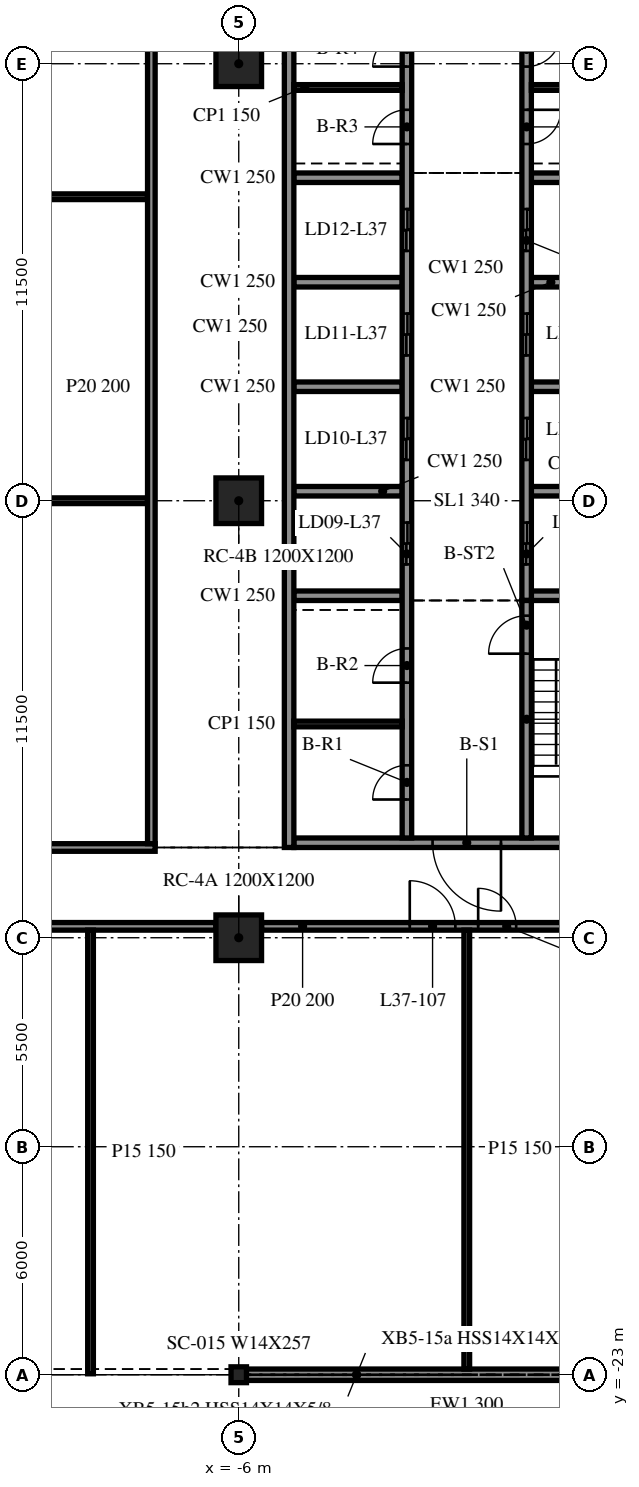
"""IFC4 building model, lengths in metres.
Left out: names, types, materials, properties, quantities, classifications, styles, units other than length and angle.
Written with IfcOpenShell. Run it as: python <this file> out.ifc"""

import sys

from ifc_helpers import new_model, si_unit, direction, frame, frame_2d, origin, origin_2d, place, context, subcontext, project, spatial, rectangle, i_section, extrude, element, fill, save


model = new_model("IFC4")
c1 = context("Model", 3, precision=1e-05, world=origin(), true_north=direction((0.0, 1.0)))
c2 = subcontext(c1, "Body", "Model", "MODEL_VIEW")
j1 = project(units=[si_unit("LENGTHUNIT", "METRE"), si_unit("PLANEANGLEUNIT", "RADIAN")], contexts=[c1])
p1 = place(None, origin())
s1 = spatial("IfcSite", under=j1, at=p1, CompositionType="ELEMENT")
p2 = place(p1, origin())
s2 = spatial("IfcBuilding", under=s1, at=p2, CompositionType="ELEMENT")
p3 = place(p2, frame((0.0, 0.0, 159.2)))
s3 = spatial("IfcBuildingStorey", under=s2, at=p3, CompositionType="ELEMENT", Elevation=159.2)
for number, where, z_axis, x_axis in (
    (1, (-6.0, -11.5, -0.34), (0.0, 0.0, 1.0), (1.0, 0.0, 0.0)),
    (2, (-6.0, 0.0, -0.34), (0.0, 0.0, 1.0), (1.0, 0.0, 0.0)),
    (3, (-6.0, 11.5, -0.34), (0.0, 0.0, 1.0), (1.0, 0.0, 0.0)),
):
    element("IfcColumn", number, at=place(p3, frame(where, z_axis=z_axis, x_axis=x_axis)), inside=s3, PredefinedType="COLUMN", context=c2, shape_type="SweptSolid", body=[
        extrude(rectangle(XDim=1.2, YDim=1.2, at=origin_2d()), origin(), (0.0, 0.0, 1.0), 3.8),
    ])
p4 = place(p3, frame((-6.0, -23.0, -0.34), z_axis=(0.0, 0.0, 1.0), x_axis=(1.0, 0.0, 0.0)))
e4 = element("IfcColumn", 4, at=p4, inside=s3, PredefinedType="COLUMN", context=c2, shape_type="SweptSolid", body=[
    extrude(i_section(OverallWidth=0.406, OverallDepth=0.417, WebThickness=0.03, FlangeThickness=0.048, at=origin_2d()), origin(), (0.0, 0.0, 1.0), 3.8),
])
p5 = place(p3, frame((-5.985, -23.0, 0.0), z_axis=(0.0, 0.0, 1.0), x_axis=(1.0, 0.0, 0.0)))
e5 = element("IfcWall", 5, at=p5, inside=s3, PredefinedType="NOTDEFINED", context=c2, shape_type="SweptSolid", body=[
    extrude(rectangle(XDim=11.97, YDim=0.3, at=frame_2d((5.985, 0.0))), origin(), (0.0, 0.0, 1.0), 2.782),
])
p6 = place(p3, frame((-4.675, 15.125, 0.0), z_axis=(0.0, 0.0, 1.0), x_axis=(0.0, -1.0, 0.0)))
e6 = element("IfcWall", 6, at=p6, inside=s3, PredefinedType="SOLIDWALL", context=c2, shape_type="SweptSolid", body=[
    extrude(rectangle(XDim=24.25, YDim=0.25, at=frame_2d((12.125, 0.0))), origin(), (0.0, 0.0, 1.0), 3.46),
])
p7 = place(p3, frame((4.55, -9.0, 0.0), z_axis=(0.0, 0.0, 1.0), x_axis=(-1.0, 0.0, 0.0)))
e7 = element("IfcWall", 7, at=p7, inside=s3, PredefinedType="SOLIDWALL", context=c2, shape_type="SweptSolid", body=[
    extrude(rectangle(XDim=9.1, YDim=0.25, at=frame_2d((4.55, 0.0))), origin(), (0.0, 0.0, 1.0), 3.46),
])
p8 = place(p7, frame((3.65, 0.0, 0.0)))
e8 = element("IfcOpeningElement", 8, at=p8, cuts=e7, PredefinedType="OPENING", context=c2, shape_type="SweptSolid", body=[
    extrude(rectangle(XDim=1.8, YDim=2.1, at=frame_2d((0.9, 1.05))), frame((0.0, 0.135, 0.0), z_axis=(0.0, -1.0, 0.0), x_axis=(1.0, 0.0, 0.0)), (0.0, 0.0, 1.0), 0.27),
])
p9 = place(p3, frame((-1.575, -8.875, 0.0), z_axis=(0.0, 0.0, 1.0), x_axis=(0.0, 1.0, 0.0)))
e9 = element("IfcWall", 9, at=p9, inside=s3, PredefinedType="SOLIDWALL", context=c2, shape_type="SweptSolid", body=[
    extrude(rectangle(XDim=23.75, YDim=0.25, at=frame_2d((11.875, 0.0))), origin(), (0.0, 0.0, 1.0), 3.46),
])
p10 = place(p9, frame((7.2, 0.0, 0.0)))
e10 = element("IfcOpeningElement", 10, at=p10, cuts=e9, PredefinedType="OPENING", context=c2, shape_type="SweptSolid", body=[
    extrude(rectangle(XDim=1.1, YDim=2.1, at=frame_2d((0.55, 1.05))), frame((0.0, 0.135, 0.0), z_axis=(0.0, -1.0, 0.0), x_axis=(1.0, 0.0, 0.0)), (0.0, 0.0, 1.0), 0.27),
])
p11 = place(p9, frame((9.95, 0.0, 0.0)))
e11 = element("IfcOpeningElement", 11, at=p11, cuts=e9, PredefinedType="OPENING", context=c2, shape_type="SweptSolid", body=[
    extrude(rectangle(XDim=1.1, YDim=2.1, at=frame_2d((0.55, 1.05))), frame((0.0, 0.135, 0.0), z_axis=(0.0, -1.0, 0.0), x_axis=(1.0, 0.0, 0.0)), (0.0, 0.0, 1.0), 0.27),
])
p12 = place(p9, frame((12.7, 0.0, 0.0)))
e12 = element("IfcOpeningElement", 12, at=p12, cuts=e9, PredefinedType="OPENING", context=c2, shape_type="SweptSolid", body=[
    extrude(rectangle(XDim=1.1, YDim=2.1, at=frame_2d((0.55, 1.05))), frame((0.0, 0.135, 0.0), z_axis=(0.0, -1.0, 0.0), x_axis=(1.0, 0.0, 0.0)), (0.0, 0.0, 1.0), 0.27),
])
p13 = place(p9, frame((15.45, 0.0, 0.0)))
e13 = element("IfcOpeningElement", 13, at=p13, cuts=e9, PredefinedType="OPENING", context=c2, shape_type="SweptSolid", body=[
    extrude(rectangle(XDim=1.1, YDim=2.1, at=frame_2d((0.55, 1.05))), frame((0.0, 0.135, 0.0), z_axis=(0.0, -1.0, 0.0), x_axis=(1.0, 0.0, 0.0)), (0.0, 0.0, 1.0), 0.27),
])
p14 = place(p9, frame((1.012, 0.0, 0.0)))
e14 = element("IfcOpeningElement", 14, at=p14, cuts=e9, PredefinedType="OPENING", context=c2, shape_type="SweptSolid", body=[
    extrude(rectangle(XDim=0.9, YDim=2.1, at=frame_2d((0.45, 1.05))), frame((0.0, 0.135, 0.0), z_axis=(0.0, -1.0, 0.0), x_axis=(1.0, 0.0, 0.0)), (0.0, 0.0, 1.0), 0.27),
])
p15 = place(p9, frame((4.087, 0.0, 0.0)))
e15 = element("IfcOpeningElement", 15, at=p15, cuts=e9, PredefinedType="OPENING", context=c2, shape_type="SweptSolid", body=[
    extrude(rectangle(XDim=0.9, YDim=2.1, at=frame_2d((0.45, 1.05))), frame((0.0, 0.135, 0.0), z_axis=(0.0, -1.0, 0.0), x_axis=(1.0, 0.0, 0.0)), (0.0, 0.0, 1.0), 0.27),
])
p16 = place(p9, frame((18.262, 0.0, 0.0)))
e16 = element("IfcOpeningElement", 16, at=p16, cuts=e9, PredefinedType="OPENING", context=c2, shape_type="SweptSolid", body=[
    extrude(rectangle(XDim=0.9, YDim=2.1, at=frame_2d((0.45, 1.05))), frame((0.0, 0.135, 0.0), z_axis=(0.0, -1.0, 0.0), x_axis=(1.0, 0.0, 0.0)), (0.0, 0.0, 1.0), 0.27),
])
p17 = place(p9, frame((20.3, 0.0, 0.0)))
e17 = element("IfcOpeningElement", 17, at=p17, cuts=e9, PredefinedType="OPENING", context=c2, shape_type="SweptSolid", body=[
    extrude(rectangle(XDim=0.9, YDim=2.1, at=frame_2d((0.45, 1.05))), frame((0.0, 0.135, 0.0), z_axis=(0.0, -1.0, 0.0), x_axis=(1.0, 0.0, 0.0)), (0.0, 0.0, 1.0), 0.27),
])
p18 = place(p9, frame((22.337, 0.0, 0.0)))
e18 = element("IfcOpeningElement", 18, at=p18, cuts=e9, PredefinedType="OPENING", context=c2, shape_type="SweptSolid", body=[
    extrude(rectangle(XDim=0.9, YDim=2.1, at=frame_2d((0.45, 1.05))), frame((0.0, 0.135, 0.0), z_axis=(0.0, -1.0, 0.0), x_axis=(1.0, 0.0, 0.0)), (0.0, 0.0, 1.0), 0.27),
])
p19 = place(p3, frame((1.575, -8.875, 0.0), z_axis=(0.0, 0.0, 1.0), x_axis=(0.0, 1.0, 0.0)))
e19 = element("IfcWall", 19, at=p19, inside=s3, PredefinedType="SOLIDWALL", context=c2, shape_type="SweptSolid", body=[
    extrude(rectangle(XDim=6.25, YDim=0.25, at=frame_2d((3.125, 0.0))), origin(), (0.0, 0.0, 1.0), 3.46),
])
p20 = place(p19, frame((4.85, 0.0, 0.0)))
e20 = element("IfcOpeningElement", 20, at=p20, cuts=e19, PredefinedType="OPENING", context=c2, shape_type="SweptSolid", body=[
    extrude(rectangle(XDim=1.0, YDim=2.1, at=frame_2d((0.5, 1.05))), frame((0.0, 0.135, 0.0), z_axis=(0.0, -1.0, 0.0), x_axis=(1.0, 0.0, 0.0)), (0.0, 0.0, 1.0), 0.27),
])
p21 = place(p3, frame((1.575, 14.875, 0.0), z_axis=(0.0, 0.0, 1.0), x_axis=(0.0, -1.0, 0.0)))
e21 = element("IfcWall", 21, at=p21, inside=s3, PredefinedType="SOLIDWALL", context=c2, shape_type="SweptSolid", body=[
    extrude(rectangle(XDim=17.5, YDim=0.25, at=frame_2d((8.75, 0.0))), origin(), (0.0, 0.0, 1.0), 3.46),
])
p22 = place(p21, frame((15.45, 0.0, 0.0)))
e22 = element("IfcOpeningElement", 22, at=p22, cuts=e21, PredefinedType="OPENING", context=c2, shape_type="SweptSolid", body=[
    extrude(rectangle(XDim=1.1, YDim=2.1, at=frame_2d((0.55, 1.05))), frame((0.0, 0.135, 0.0), z_axis=(0.0, -1.0, 0.0), x_axis=(1.0, 0.0, 0.0)), (0.0, 0.0, 1.0), 0.27),
])
p23 = place(p21, frame((12.7, 0.0, 0.0)))
e23 = element("IfcOpeningElement", 23, at=p23, cuts=e21, PredefinedType="OPENING", context=c2, shape_type="SweptSolid", body=[
    extrude(rectangle(XDim=1.1, YDim=2.1, at=frame_2d((0.55, 1.05))), frame((0.0, 0.135, 0.0), z_axis=(0.0, -1.0, 0.0), x_axis=(1.0, 0.0, 0.0)), (0.0, 0.0, 1.0), 0.27),
])
p24 = place(p21, frame((9.95, 0.0, 0.0)))
e24 = element("IfcOpeningElement", 24, at=p24, cuts=e21, PredefinedType="OPENING", context=c2, shape_type="SweptSolid", body=[
    extrude(rectangle(XDim=1.1, YDim=2.1, at=frame_2d((0.55, 1.05))), frame((0.0, 0.135, 0.0), z_axis=(0.0, -1.0, 0.0), x_axis=(1.0, 0.0, 0.0)), (0.0, 0.0, 1.0), 0.27),
])
p25 = place(p21, frame((7.2, 0.0, 0.0)))
e25 = element("IfcOpeningElement", 25, at=p25, cuts=e21, PredefinedType="OPENING", context=c2, shape_type="SweptSolid", body=[
    extrude(rectangle(XDim=1.1, YDim=2.1, at=frame_2d((0.55, 1.05))), frame((0.0, 0.135, 0.0), z_axis=(0.0, -1.0, 0.0), x_axis=(1.0, 0.0, 0.0)), (0.0, 0.0, 1.0), 0.27),
])
p26 = place(p21, frame((4.587, 0.0, 0.0)))
e26 = element("IfcOpeningElement", 26, at=p26, cuts=e21, PredefinedType="OPENING", context=c2, shape_type="SweptSolid", body=[
    extrude(rectangle(XDim=0.9, YDim=2.1, at=frame_2d((0.45, 1.05))), frame((0.0, 0.135, 0.0), z_axis=(0.0, -1.0, 0.0), x_axis=(1.0, 0.0, 0.0)), (0.0, 0.0, 1.0), 0.27),
])
p27 = place(p21, frame((2.55, 0.0, 0.0)))
e27 = element("IfcOpeningElement", 27, at=p27, cuts=e21, PredefinedType="OPENING", context=c2, shape_type="SweptSolid", body=[
    extrude(rectangle(XDim=0.9, YDim=2.1, at=frame_2d((0.45, 1.05))), frame((0.0, 0.135, 0.0), z_axis=(0.0, -1.0, 0.0), x_axis=(1.0, 0.0, 0.0)), (0.0, 0.0, 1.0), 0.27),
])
p28 = place(p21, frame((0.512, 0.0, 0.0)))
e28 = element("IfcOpeningElement", 28, at=p28, cuts=e21, PredefinedType="OPENING", context=c2, shape_type="SweptSolid", body=[
    extrude(rectangle(XDim=0.9, YDim=2.1, at=frame_2d((0.45, 1.05))), frame((0.0, 0.135, 0.0), z_axis=(0.0, -1.0, 0.0), x_axis=(1.0, 0.0, 0.0)), (0.0, 0.0, 1.0), 0.27),
])
for number, where, z_axis, x_axis in (
    (29, (-4.55, -2.5, 0.0), (0.0, 0.0, 1.0), (1.0, 0.0, 0.0)),
    (30, (-4.55, 0.25, 0.0), (0.0, 0.0, 1.0), (1.0, 0.0, 0.0)),
    (31, (-4.55, 3.0, 0.0), (0.0, 0.0, 1.0), (1.0, 0.0, 0.0)),
    (32, (-4.55, 5.75, 0.0), (0.0, 0.0, 1.0), (1.0, 0.0, 0.0)),
    (33, (-4.55, 8.5, 0.0), (0.0, 0.0, 1.0), (1.0, 0.0, 0.0)),
    (34, (1.7, -2.5, 0.0), (0.0, 0.0, 1.0), (1.0, 0.0, 0.0)),
    (35, (1.7, 0.25, 0.0), (0.0, 0.0, 1.0), (1.0, 0.0, 0.0)),
    (36, (1.7, 3.0, 0.0), (0.0, 0.0, 1.0), (1.0, 0.0, 0.0)),
    (37, (1.7, 5.75, 0.0), (0.0, 0.0, 1.0), (1.0, 0.0, 0.0)),
    (38, (1.7, 8.5, 0.0), (0.0, 0.0, 1.0), (1.0, 0.0, 0.0)),
):
    element("IfcWall", number, at=place(p3, frame(where, z_axis=z_axis, x_axis=x_axis)), inside=s3, PredefinedType="SOLIDWALL", context=c2, shape_type="SweptSolid", body=[
        extrude(rectangle(XDim=2.85, YDim=0.25, at=frame_2d((1.425, 0.0))), origin(), (0.0, 0.0, 1.0), 3.46),
    ])
for number, where, z_axis, x_axis in (
    (39, (-4.55, -5.875, 0.0), (0.0, 0.0, 1.0), (1.0, 0.0, 0.0)),
    (40, (-4.55, 10.875, 0.0), (0.0, 0.0, 1.0), (1.0, 0.0, 0.0)),
    (41, (1.7, 10.875, 0.0), (0.0, 0.0, 1.0), (1.0, 0.0, 0.0)),
):
    element("IfcWall", number, at=place(p3, frame(where, z_axis=z_axis, x_axis=x_axis)), inside=s3, PredefinedType="PARTITIONING", context=c2, shape_type="SweptSolid", body=[
        extrude(rectangle(XDim=2.85, YDim=0.15, at=frame_2d((1.425, 0.0))), origin(), (0.0, 0.0, 1.0), 3.46),
    ])
p29 = place(p3, frame((-17.4, -11.2, 0.0), z_axis=(0.0, 0.0, 1.0), x_axis=(1.0, 0.0, 0.0)))
e42 = element("IfcWall", 42, at=p29, inside=s3, PredefinedType="PARTITIONING", context=c2, shape_type="SweptSolid", body=[
    extrude(rectangle(XDim=10.8, YDim=0.2, at=frame_2d((5.4, 0.0))), origin(), (0.0, 0.0, 1.0), 3.46),
])
p30 = place(p29, frame((4.7, 0.0, 0.0)))
e43 = element("IfcOpeningElement", 43, at=p30, cuts=e42, PredefinedType="OPENING", context=c2, shape_type="SweptSolid", body=[
    extrude(rectangle(XDim=1.2, YDim=2.1, at=frame_2d((0.6, 1.05))), frame((0.0, 0.11, 0.0), z_axis=(0.0, -1.0, 0.0), x_axis=(1.0, 0.0, 0.0)), (0.0, 0.0, 1.0), 0.22),
])
p31 = place(p3, frame((-5.4, -11.2, 0.0), z_axis=(0.0, 0.0, 1.0), x_axis=(1.0, 0.0, 0.0)))
e44 = element("IfcWall", 44, at=p31, inside=s3, PredefinedType="PARTITIONING", context=c2, shape_type="SweptSolid", body=[
    extrude(rectangle(XDim=10.8, YDim=0.2, at=frame_2d((5.4, 0.0))), origin(), (0.0, 0.0, 1.0), 3.46),
])
p32 = place(p31, frame((3.9, 0.0, 0.0)))
e45 = element("IfcOpeningElement", 45, at=p32, cuts=e44, PredefinedType="OPENING", context=c2, shape_type="SweptSolid", body=[
    extrude(rectangle(XDim=1.2, YDim=2.1, at=frame_2d((0.6, 1.05))), frame((0.0, 0.11, 0.0), z_axis=(0.0, -1.0, 0.0), x_axis=(1.0, 0.0, 0.0)), (0.0, 0.0, 1.0), 0.22),
])
p33 = place(p31, frame((5.7, 0.0, 0.0)))
e46 = element("IfcOpeningElement", 46, at=p33, cuts=e44, PredefinedType="OPENING", context=c2, shape_type="SweptSolid", body=[
    extrude(rectangle(XDim=1.0, YDim=2.1, at=frame_2d((0.5, 1.05))), frame((0.0, 0.11, 0.0), z_axis=(0.0, -1.0, 0.0), x_axis=(1.0, 0.0, 0.0)), (0.0, 0.0, 1.0), 0.22),
])
p34 = place(p3, frame((-15.9, -9.125, 0.0), z_axis=(0.0, 0.0, 1.0), x_axis=(1.0, 0.0, 0.0)))
e47 = element("IfcWall", 47, at=p34, inside=s3, PredefinedType="PARTITIONING", context=c2, shape_type="SweptSolid", body=[
    extrude(rectangle(XDim=7.7, YDim=0.2, at=frame_2d((3.85, 0.0))), origin(), (0.0, 0.0, 1.0), 3.46),
])
p35 = place(p34, frame((3.3, 0.0, 0.0)))
e48 = element("IfcOpeningElement", 48, at=p35, cuts=e47, PredefinedType="OPENING", context=c2, shape_type="SweptSolid", body=[
    extrude(rectangle(XDim=0.9, YDim=2.1, at=frame_2d((0.45, 1.05))), frame((0.0, 0.11, 0.0), z_axis=(0.0, -1.0, 0.0), x_axis=(1.0, 0.0, 0.0)), (0.0, 0.0, 1.0), 0.22),
])
for number, where, z_axis, x_axis in (
    (49, (-15.7, 0.0, 0.0), (0.0, 0.0, 1.0), (1.0, 0.0, 0.0)),
    (50, (-15.7, 8.0, 0.0), (0.0, 0.0, 1.0), (1.0, 0.0, 0.0)),
):
    element("IfcWall", number, at=place(p3, frame(where, z_axis=z_axis, x_axis=x_axis)), inside=s3, PredefinedType="PARTITIONING", context=c2, shape_type="SweptSolid", body=[
        extrude(rectangle(XDim=7.3, YDim=0.15, at=frame_2d((3.65, 0.0))), origin(), (0.0, 0.0, 1.0), 3.46),
    ])
p36 = place(p3, frame((-9.9, -22.975, 0.0), z_axis=(0.0, 0.0, 1.0), x_axis=(0.0, 1.0, 0.0)))
e51 = element("IfcWall", 51, at=p36, inside=s3, PredefinedType="PARTITIONING", context=c2, shape_type="SweptSolid", body=[
    extrude(rectangle(XDim=11.675, YDim=0.15, at=frame_2d((5.837, 0.0))), origin(), (0.0, 0.0, 1.0), 3.46),
])
p37 = place(p3, frame((-8.3, -9.025, 0.0), z_axis=(0.0, 0.0, 1.0), x_axis=(0.0, 1.0, 0.0)))
e52 = element("IfcWall", 52, at=p37, inside=s3, PredefinedType="PARTITIONING", context=c2, shape_type="SweptSolid", body=[
    extrude(rectangle(XDim=24.05, YDim=0.2, at=frame_2d((12.025, 0.0))), origin(), (0.0, 0.0, 1.0), 3.46),
])
p38 = place(p3, frame((0.0, -22.85, 0.0), z_axis=(0.0, 0.0, 1.0), x_axis=(0.0, 1.0, 0.0)))
e53 = element("IfcWall", 53, at=p38, inside=s3, PredefinedType="PARTITIONING", context=c2, shape_type="SweptSolid", body=[
    extrude(rectangle(XDim=11.55, YDim=0.15, at=frame_2d((5.775, 0.0))), origin(), (0.0, 0.0, 1.0), 3.46),
])
p39 = place(p8, origin())
e54 = element("IfcDoor", 54, at=p39, inside=s3, OperationType="DOUBLE_DOOR_SINGLE_SWING", PredefinedType="DOOR", context=c2, shape_type="SweptSolid", body=[
    extrude(rectangle(XDim=1.8, YDim=2.1, at=frame_2d((0.9, 1.05))), frame((0.0, 0.025, 0.0), z_axis=(0.0, -1.0, 0.0), x_axis=(1.0, 0.0, 0.0)), (0.0, 0.0, 1.0), 0.05),
])
fill(e8, e54)
p40 = place(p22, origin())
e55 = element("IfcDoor", 55, at=p40, inside=s3, OperationType="DOUBLE_DOOR_SLIDING", PredefinedType="DOOR", context=c2, shape_type="SweptSolid", body=[
    extrude(rectangle(XDim=1.1, YDim=2.1, at=frame_2d((0.55, 1.05))), frame((0.0, 0.025, 0.0), z_axis=(0.0, -1.0, 0.0), x_axis=(1.0, 0.0, 0.0)), (0.0, 0.0, 1.0), 0.05),
])
fill(e22, e55)
p41 = place(p23, origin())
e56 = element("IfcDoor", 56, at=p41, inside=s3, OperationType="DOUBLE_DOOR_SLIDING", PredefinedType="DOOR", context=c2, shape_type="SweptSolid", body=[
    extrude(rectangle(XDim=1.1, YDim=2.1, at=frame_2d((0.55, 1.05))), frame((0.0, 0.025, 0.0), z_axis=(0.0, -1.0, 0.0), x_axis=(1.0, 0.0, 0.0)), (0.0, 0.0, 1.0), 0.05),
])
fill(e23, e56)
p42 = place(p24, origin())
e57 = element("IfcDoor", 57, at=p42, inside=s3, OperationType="DOUBLE_DOOR_SLIDING", PredefinedType="DOOR", context=c2, shape_type="SweptSolid", body=[
    extrude(rectangle(XDim=1.1, YDim=2.1, at=frame_2d((0.55, 1.05))), frame((0.0, 0.025, 0.0), z_axis=(0.0, -1.0, 0.0), x_axis=(1.0, 0.0, 0.0)), (0.0, 0.0, 1.0), 0.05),
])
fill(e24, e57)
p43 = place(p25, origin())
e58 = element("IfcDoor", 58, at=p43, inside=s3, OperationType="DOUBLE_DOOR_SLIDING", PredefinedType="DOOR", context=c2, shape_type="SweptSolid", body=[
    extrude(rectangle(XDim=1.1, YDim=2.1, at=frame_2d((0.55, 1.05))), frame((0.0, 0.025, 0.0), z_axis=(0.0, -1.0, 0.0), x_axis=(1.0, 0.0, 0.0)), (0.0, 0.0, 1.0), 0.05),
])
fill(e25, e58)
p44 = place(p10, origin())
e59 = element("IfcDoor", 59, at=p44, inside=s3, OperationType="DOUBLE_DOOR_SLIDING", PredefinedType="DOOR", context=c2, shape_type="SweptSolid", body=[
    extrude(rectangle(XDim=1.1, YDim=2.1, at=frame_2d((0.55, 1.05))), frame((0.0, 0.025, 0.0), z_axis=(0.0, -1.0, 0.0), x_axis=(1.0, 0.0, 0.0)), (0.0, 0.0, 1.0), 0.05),
])
fill(e10, e59)
p45 = place(p11, origin())
e60 = element("IfcDoor", 60, at=p45, inside=s3, OperationType="DOUBLE_DOOR_SLIDING", PredefinedType="DOOR", context=c2, shape_type="SweptSolid", body=[
    extrude(rectangle(XDim=1.1, YDim=2.1, at=frame_2d((0.55, 1.05))), frame((0.0, 0.025, 0.0), z_axis=(0.0, -1.0, 0.0), x_axis=(1.0, 0.0, 0.0)), (0.0, 0.0, 1.0), 0.05),
])
fill(e11, e60)
p46 = place(p12, origin())
e61 = element("IfcDoor", 61, at=p46, inside=s3, OperationType="DOUBLE_DOOR_SLIDING", PredefinedType="DOOR", context=c2, shape_type="SweptSolid", body=[
    extrude(rectangle(XDim=1.1, YDim=2.1, at=frame_2d((0.55, 1.05))), frame((0.0, 0.025, 0.0), z_axis=(0.0, -1.0, 0.0), x_axis=(1.0, 0.0, 0.0)), (0.0, 0.0, 1.0), 0.05),
])
fill(e12, e61)
p47 = place(p13, origin())
e62 = element("IfcDoor", 62, at=p47, inside=s3, OperationType="DOUBLE_DOOR_SLIDING", PredefinedType="DOOR", context=c2, shape_type="SweptSolid", body=[
    extrude(rectangle(XDim=1.1, YDim=2.1, at=frame_2d((0.55, 1.05))), frame((0.0, 0.025, 0.0), z_axis=(0.0, -1.0, 0.0), x_axis=(1.0, 0.0, 0.0)), (0.0, 0.0, 1.0), 0.05),
])
fill(e13, e62)
p48 = place(p14, origin())
e63 = element("IfcDoor", 63, at=p48, inside=s3, OperationType="SINGLE_SWING_LEFT", PredefinedType="DOOR", context=c2, shape_type="SweptSolid", body=[
    extrude(rectangle(XDim=0.9, YDim=2.1, at=frame_2d((0.45, 1.05))), frame((0.0, 0.025, 0.0), z_axis=(0.0, -1.0, 0.0), x_axis=(1.0, 0.0, 0.0)), (0.0, 0.0, 1.0), 0.05),
])
fill(e14, e63)
p49 = place(p15, origin())
e64 = element("IfcDoor", 64, at=p49, inside=s3, OperationType="SINGLE_SWING_RIGHT", PredefinedType="DOOR", context=c2, shape_type="SweptSolid", body=[
    extrude(rectangle(XDim=0.9, YDim=2.1, at=frame_2d((0.45, 1.05))), frame((0.0, 0.025, 0.0), z_axis=(0.0, -1.0, 0.0), x_axis=(1.0, 0.0, 0.0)), (0.0, 0.0, 1.0), 0.05),
])
fill(e15, e64)
p50 = place(p16, origin())
e65 = element("IfcDoor", 65, at=p50, inside=s3, OperationType="SINGLE_SWING_LEFT", PredefinedType="DOOR", context=c2, shape_type="SweptSolid", body=[
    extrude(rectangle(XDim=0.9, YDim=2.1, at=frame_2d((0.45, 1.05))), frame((0.0, 0.025, 0.0), z_axis=(0.0, -1.0, 0.0), x_axis=(1.0, 0.0, 0.0)), (0.0, 0.0, 1.0), 0.05),
])
fill(e16, e65)
p51 = place(p17, origin())
e66 = element("IfcDoor", 66, at=p51, inside=s3, OperationType="SINGLE_SWING_RIGHT", PredefinedType="DOOR", context=c2, shape_type="SweptSolid", body=[
    extrude(rectangle(XDim=0.9, YDim=2.1, at=frame_2d((0.45, 1.05))), frame((0.0, 0.025, 0.0), z_axis=(0.0, -1.0, 0.0), x_axis=(1.0, 0.0, 0.0)), (0.0, 0.0, 1.0), 0.05),
])
fill(e17, e66)
p52 = place(p26, origin())
e67 = element("IfcDoor", 67, at=p52, inside=s3, OperationType="SINGLE_SWING_RIGHT", PredefinedType="DOOR", context=c2, shape_type="SweptSolid", body=[
    extrude(rectangle(XDim=0.9, YDim=2.1, at=frame_2d((0.45, 1.05))), frame((0.0, 0.025, 0.0), z_axis=(0.0, -1.0, 0.0), x_axis=(1.0, 0.0, 0.0)), (0.0, 0.0, 1.0), 0.05),
])
fill(e26, e67)
p53 = place(p27, origin())
e68 = element("IfcDoor", 68, at=p53, inside=s3, OperationType="SINGLE_SWING_LEFT", PredefinedType="DOOR", context=c2, shape_type="SweptSolid", body=[
    extrude(rectangle(XDim=0.9, YDim=2.1, at=frame_2d((0.45, 1.05))), frame((0.0, 0.025, 0.0), z_axis=(0.0, -1.0, 0.0), x_axis=(1.0, 0.0, 0.0)), (0.0, 0.0, 1.0), 0.05),
])
fill(e27, e68)
p54 = place(p20, origin())
e69 = element("IfcDoor", 69, at=p54, inside=s3, OperationType="SINGLE_SWING_LEFT", PredefinedType="DOOR", context=c2, shape_type="SweptSolid", body=[
    extrude(rectangle(XDim=1.0, YDim=2.1, at=frame_2d((0.5, 1.05))), frame((0.0, 0.025, 0.0), z_axis=(0.0, -1.0, 0.0), x_axis=(1.0, 0.0, 0.0)), (0.0, 0.0, 1.0), 0.05),
])
fill(e20, e69)
p55 = place(p32, origin())
e70 = element("IfcDoor", 70, at=p55, inside=s3, OperationType="SINGLE_SWING_RIGHT", PredefinedType="DOOR", context=c2, shape_type="SweptSolid", body=[
    extrude(rectangle(XDim=1.2, YDim=2.1, at=frame_2d((0.6, 1.05))), frame((0.0, 0.025, 0.0), z_axis=(0.0, -1.0, 0.0), x_axis=(1.0, 0.0, 0.0)), (0.0, 0.0, 1.0), 0.05),
])
fill(e45, e70)
p56 = place(p33, origin())
e71 = element("IfcDoor", 71, at=p56, inside=s3, OperationType="SINGLE_SWING_LEFT", PredefinedType="DOOR", context=c2, shape_type="SweptSolid", body=[
    extrude(rectangle(XDim=1.0, YDim=2.1, at=frame_2d((0.5, 1.05))), frame((0.0, 0.025, 0.0), z_axis=(0.0, -1.0, 0.0), x_axis=(1.0, 0.0, 0.0)), (0.0, 0.0, 1.0), 0.05),
])
fill(e46, e71)
save(model, sys.argv[1])
